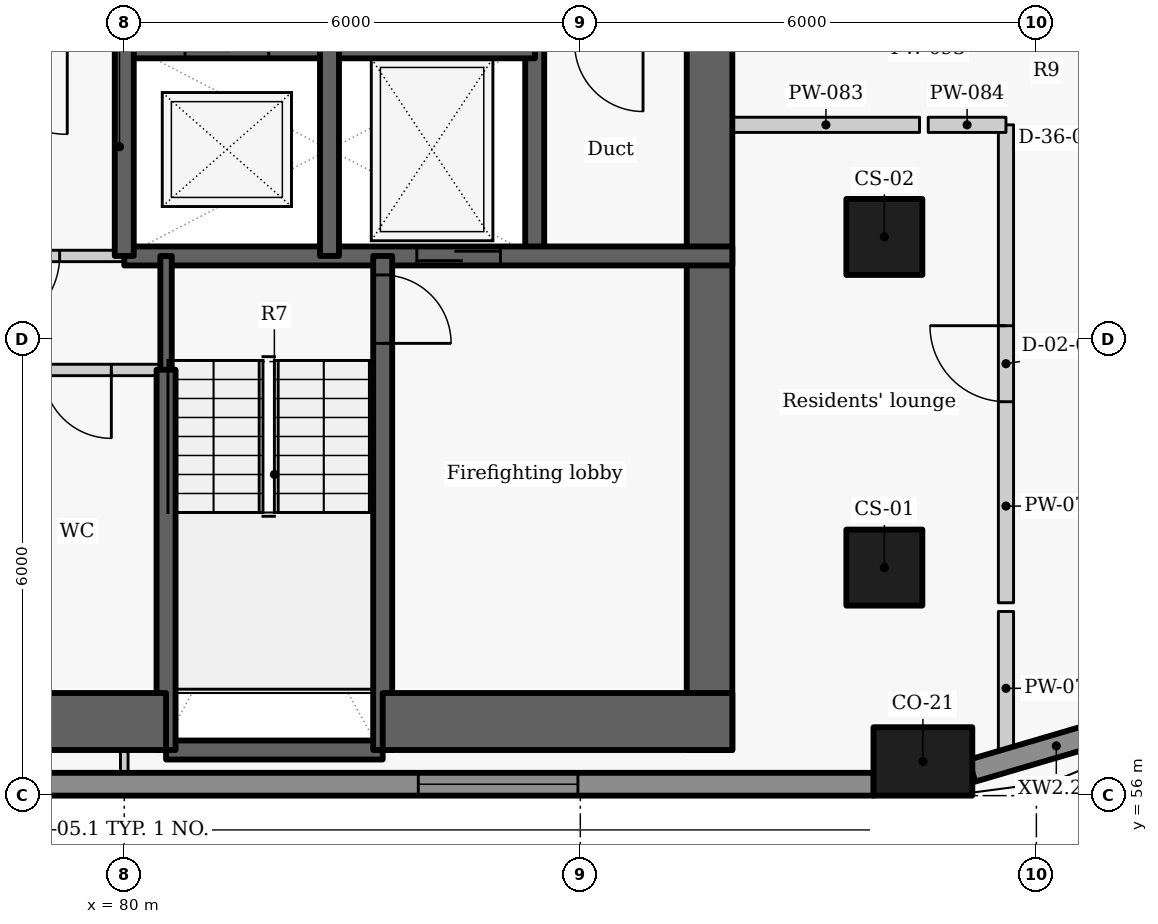
"""IFC4 building model, lengths in metres.
Left out: names, types, materials, properties, quantities, classifications, styles, units other than length and angle.
Written with IfcOpenShell. Run it as: python <this file> out.ifc"""

import sys

from ifc_helpers import new_model, si_unit, direction, frame, frame_2d, origin, origin_2d, place, context, subcontext, project, spatial, rectangle, extrude, element, fill, save


model = new_model("IFC4")
c1 = context("Model", 3, precision=1e-05, world=origin(), true_north=direction((0.0, 1.0)))
c2 = subcontext(c1, "Body", "Model", "MODEL_VIEW")
j1 = project(units=[si_unit("LENGTHUNIT", "METRE"), si_unit("PLANEANGLEUNIT", "RADIAN")], contexts=[c1])
p1 = place(None, origin())
s1 = spatial("IfcSite", under=j1, at=p1, CompositionType="ELEMENT")
p2 = place(p1, origin())
s2 = spatial("IfcBuilding", under=s1, at=p2, CompositionType="ELEMENT")
p3 = place(p2, frame((0.0, 0.0, 166.8)))
s3 = spatial("IfcBuildingStorey", under=s2, at=p3, CompositionType="ELEMENT", Elevation=166.8)
p4 = place(p3, frame((90.507, 56.45, 0.0), z_axis=(0.0, 0.0, 1.0), x_axis=(1.0, 0.0, 0.0)))
e1 = element("IfcColumn", 1, at=p4, inside=s3, PredefinedType="COLUMN", context=c2, shape_type="SweptSolid", body=[
    extrude(rectangle(XDim=1.3, YDim=0.9, at=origin_2d()), origin(), (0.0, 0.0, 1.0), 3.3),
])
for number, where, z_axis, x_axis in (
    (2, (90.0, 59.0, 0.0), (0.0, 0.0, 1.0), (0.0, 1.0, 0.0)),
    (3, (90.0, 63.35, 0.0), (0.0, 0.0, 1.0), (0.0, 1.0, 0.0)),
):
    element("IfcColumn", number, at=place(p3, frame(where, z_axis=z_axis, x_axis=x_axis)), inside=s3, PredefinedType="COLUMN", context=c2, shape_type="SweptSolid", body=[
        extrude(rectangle(XDim=1.0, YDim=1.0, at=origin_2d()), origin(), (0.0, 0.0, 1.0), 3.3),
    ])
p5 = place(p3, frame((69.821, 56.15, 0.0), z_axis=(0.0, 0.0, 1.0), x_axis=(1.0, 0.0, 0.0)))
e4 = element("IfcWall", 4, at=p5, inside=s3, PredefinedType="SOLIDWALL", context=c2, shape_type="SweptSolid", body=[
    extrude(rectangle(XDim=20.04, YDim=0.3, at=frame_2d((10.02, 0.0))), origin(), (0.0, 0.0, 1.0), 2.05),
])
p6 = place(p5, frame((4.051, 0.0, 0.9)))
e5 = element("IfcOpeningElement", 5, at=p6, cuts=e4, PredefinedType="OPENING", context=c2, shape_type="SweptSolid", body=[
    extrude(rectangle(XDim=2.1, YDim=1.1, at=frame_2d((1.05, 0.55))), frame((0.0, 0.16, 0.0), z_axis=(0.0, -1.0, 0.0), x_axis=(1.0, 0.0, 0.0)), (0.0, 0.0, 1.0), 0.32),
])
p7 = place(p5, frame((14.047, 0.0, 0.9)))
e6 = element("IfcOpeningElement", 6, at=p7, cuts=e4, PredefinedType="OPENING", context=c2, shape_type="SweptSolid", body=[
    extrude(rectangle(XDim=2.1, YDim=1.1, at=frame_2d((1.05, 0.55))), frame((0.0, 0.16, 0.0), z_axis=(0.0, -1.0, 0.0), x_axis=(1.0, 0.0, 0.0)), (0.0, 0.0, 1.0), 0.32),
])
p8 = place(p3, frame((91.153, 56.328, 0.0), z_axis=(0.0, 0.0, 1.0), x_axis=(0.959473072336, 0.281800325517, 0.0)))
e7 = element("IfcWall", 7, at=p8, inside=s3, PredefinedType="SOLIDWALL", context=c2, shape_type="SweptSolid", body=[
    extrude(rectangle(XDim=2.312, YDim=0.3, at=frame_2d((1.156, 0.0))), origin(), (0.0, 0.0, 1.0), 2.05),
])
p9 = place(p3, frame((85.4, 63.1, -0.275), z_axis=(0.0, 0.0, 1.0), x_axis=(0.0, 1.0, 0.0)))
e8 = element("IfcWall", 8, at=p9, inside=s3, PredefinedType="SHEAR", context=c2, shape_type="SweptSolid", body=[
    extrude(rectangle(XDim=2.8, YDim=0.25, at=frame_2d((1.4, 0.0))), origin(), (0.0, 0.0, 1.0), 3.225),
])
p10 = place(p3, frame((87.7, 72.2, -0.275), z_axis=(0.0, 0.0, 1.0), x_axis=(0.0, -1.0, 0.0)))
e9 = element("IfcWall", 9, at=p10, inside=s3, PredefinedType="SHEAR", context=c2, shape_type="SweptSolid", body=[
    extrude(rectangle(XDim=15.6, YDim=0.6, at=frame_2d((7.8, 0.0))), origin(), (0.0, 0.0, 1.0), 3.225),
])
p11 = place(p10, frame((3.852, 0.0, 0.275)))
e10 = element("IfcOpeningElement", 10, at=p11, cuts=e9, PredefinedType="OPENING", context=c2, shape_type="SweptSolid", body=[
    extrude(rectangle(XDim=1.5, YDim=2.1, at=frame_2d((0.75, 1.05))), frame((0.0, 0.31, 0.0), z_axis=(0.0, -1.0, 0.0), x_axis=(1.0, 0.0, 0.0)), (0.0, 0.0, 1.0), 0.62),
])
p12 = place(p3, frame((79.997, 65.9, -0.275), z_axis=(0.0, 0.0, 1.0), x_axis=(1.0, 0.0, 0.0)))
e11 = element("IfcWall", 11, at=p12, inside=s3, PredefinedType="SHEAR", context=c2, shape_type="SweptSolid", body=[
    extrude(rectangle(XDim=5.406, YDim=0.4, at=frame_2d((2.703, 0.0))), origin(), (0.0, 0.0, 1.0), 3.225),
])
p13 = place(p12, frame((0.803, 0.0, 0.275)))
e12 = element("IfcOpeningElement", 12, at=p13, cuts=e11, PredefinedType="OPENING", context=c2, shape_type="SweptSolid", body=[
    extrude(rectangle(XDim=1.1, YDim=2.1, at=frame_2d((0.55, 1.05))), frame((0.0, 0.21, 0.0), z_axis=(0.0, -1.0, 0.0), x_axis=(1.0, 0.0, 0.0)), (0.0, 0.0, 1.0), 0.42),
])
p14 = place(p3, frame((80.0, 63.1, -0.275), z_axis=(0.0, 0.0, 1.0), x_axis=(1.0, 0.0, 0.0)))
e13 = element("IfcWall", 13, at=p14, inside=s3, PredefinedType="SHEAR", context=c2, shape_type="SweptSolid", body=[
    extrude(rectangle(XDim=8.0, YDim=0.25, at=frame_2d((4.0, 0.0))), origin(), (0.0, 0.0, 1.0), 3.225),
])
p15 = place(p14, frame((3.849, 0.0, 0.275)))
e14 = element("IfcOpeningElement", 14, at=p15, cuts=e13, PredefinedType="OPENING", context=c2, shape_type="SweptSolid", body=[
    extrude(rectangle(XDim=1.1, YDim=2.1, at=frame_2d((0.55, 1.05))), frame((0.0, 0.135, 0.0), z_axis=(0.0, -1.0, 0.0), x_axis=(1.0, 0.0, 0.0)), (0.0, 0.0, 1.0), 0.27),
])
p16 = place(p3, frame((80.0, 63.1, -0.275), z_axis=(0.0, 0.0, 1.0), x_axis=(0.0, 1.0, 0.0)))
e15 = element("IfcWall", 15, at=p16, inside=s3, PredefinedType="SHEAR", context=c2, shape_type="SweptSolid", body=[
    extrude(rectangle(XDim=2.8, YDim=0.25, at=frame_2d((1.4, 0.0))), origin(), (0.0, 0.0, 1.0), 3.225),
])
p17 = place(p3, frame((80.0, 63.1, 0.0), z_axis=(0.0, 0.0, 1.0), x_axis=(-1.0, 0.0, 0.0)))
e16 = element("IfcWall", 16, at=p17, inside=s3, PredefinedType="PARTITIONING", context=c2, shape_type="SweptSolid", body=[
    extrude(rectangle(XDim=2.7, YDim=0.15, at=frame_2d((1.35, 0.0))), origin(), (0.0, 0.0, 1.0), 2.95),
])
p18 = place(p17, frame((0.85, 0.0, 0.0)))
e17 = element("IfcOpeningElement", 17, at=p18, cuts=e16, PredefinedType="OPENING", context=c2, shape_type="SweptSolid", body=[
    extrude(rectangle(XDim=1.0, YDim=2.1, at=frame_2d((0.5, 1.05))), frame((0.0, 0.085, 0.0), z_axis=(0.0, -1.0, 0.0), x_axis=(1.0, 0.0, 0.0)), (0.0, 0.0, 1.0), 0.17),
])
p19 = place(p3, frame((82.7, 63.1, -0.275), z_axis=(0.0, 0.0, 1.0), x_axis=(0.0, 1.0, 0.0)))
e18 = element("IfcWall", 18, at=p19, inside=s3, PredefinedType="SHEAR", context=c2, shape_type="SweptSolid", body=[
    extrude(rectangle(XDim=2.8, YDim=0.25, at=frame_2d((1.4, 0.0))), origin(), (0.0, 0.0, 1.0), 3.225),
])
p20 = place(p3, frame((80.55, 56.6, -0.275), z_axis=(0.0, 0.0, 1.0), x_axis=(1.0, 0.0, 0.0)))
e19 = element("IfcWall", 19, at=p20, inside=s3, PredefinedType="SHEAR", context=c2, shape_type="SweptSolid", body=[
    extrude(rectangle(XDim=2.85, YDim=0.25, at=frame_2d((1.425, 0.0))), origin(), (0.0, 0.0, 1.0), 3.225),
])
p21 = place(p3, frame((83.4, 63.1, -0.275), z_axis=(0.0, 0.0, 1.0), x_axis=(0.0, -1.0, 0.0)))
e20 = element("IfcWall", 20, at=p21, inside=s3, PredefinedType="SHEAR", context=c2, shape_type="SweptSolid", body=[
    extrude(rectangle(XDim=6.5, YDim=0.25, at=frame_2d((3.25, 0.0))), origin(), (0.0, 0.0, 1.0), 3.225),
])
p22 = place(p21, frame((0.25, 0.0, 0.275)))
e21 = element("IfcOpeningElement", 21, at=p22, cuts=e20, PredefinedType="OPENING", context=c2, shape_type="SweptSolid", body=[
    extrude(rectangle(XDim=0.9, YDim=2.1, at=frame_2d((0.45, 1.05))), frame((0.0, 0.135, 0.0), z_axis=(0.0, -1.0, 0.0), x_axis=(1.0, 0.0, 0.0)), (0.0, 0.0, 1.0), 0.27),
])
p23 = place(p3, frame((80.55, 61.597, -0.275), z_axis=(0.0, 0.0, 1.0), x_axis=(0.0, 1.0, 0.0)))
e22 = element("IfcWall", 22, at=p23, inside=s3, PredefinedType="SHEAR", context=c2, shape_type="SweptSolid", body=[
    extrude(rectangle(XDim=1.503, YDim=0.15, at=frame_2d((0.751, 0.0))), origin(), (0.0, 0.0, 1.0), 3.225),
])
p24 = place(p3, frame((80.55, 56.6, -0.275), z_axis=(0.0, 0.0, 1.0), x_axis=(0.0, 1.0, 0.0)))
e23 = element("IfcWall", 23, at=p24, inside=s3, PredefinedType="SHEAR", context=c2, shape_type="SweptSolid", body=[
    extrude(rectangle(XDim=5.003, YDim=0.25, at=frame_2d((2.501, 0.0))), origin(), (0.0, 0.0, 1.0), 3.225),
])
p25 = place(p3, frame((75.35, 56.975, -0.275), z_axis=(0.0, 0.0, 1.0), x_axis=(1.0, 0.0, 0.0)))
e24 = element("IfcWall", 24, at=p25, inside=s3, PredefinedType="SHEAR", context=c2, shape_type="SweptSolid", body=[
    extrude(rectangle(XDim=5.2, YDim=0.75, at=frame_2d((2.6, 0.0))), origin(), (0.0, 0.0, 1.0), 3.225),
])
p26 = place(p3, frame((83.4, 56.975, -0.275), z_axis=(0.0, 0.0, 1.0), x_axis=(1.0, 0.0, 0.0)))
e25 = element("IfcWall", 25, at=p26, inside=s3, PredefinedType="SHEAR", context=c2, shape_type="SweptSolid", body=[
    extrude(rectangle(XDim=4.6, YDim=0.75, at=frame_2d((2.3, 0.0))), origin(), (0.0, 0.0, 1.0), 3.225),
])
p27 = place(p3, frame((80.55, 61.6, 0.0), z_axis=(0.0, 0.0, 1.0), x_axis=(-1.0, 0.0, 0.0)))
e26 = element("IfcWall", 26, at=p27, inside=s3, PredefinedType="PARTITIONING", context=c2, shape_type="SweptSolid", body=[
    extrude(rectangle(XDim=5.2, YDim=0.15, at=frame_2d((2.6, 0.0))), origin(), (0.0, 0.0, 1.0), 2.95),
])
p28 = place(p27, frame((4.1, 0.0, 0.0)))
e27 = element("IfcOpeningElement", 27, at=p28, cuts=e26, PredefinedType="OPENING", context=c2, shape_type="SweptSolid", body=[
    extrude(rectangle(XDim=0.9, YDim=2.1, at=frame_2d((0.45, 1.05))), frame((0.0, 0.085, 0.0), z_axis=(0.0, -1.0, 0.0), x_axis=(1.0, 0.0, 0.0)), (0.0, 0.0, 1.0), 0.17),
])
p29 = place(p27, frame((2.67, 0.0, 0.0)))
e28 = element("IfcOpeningElement", 28, at=p29, cuts=e26, PredefinedType="OPENING", context=c2, shape_type="SweptSolid", body=[
    extrude(rectangle(XDim=0.9, YDim=2.1, at=frame_2d((0.45, 1.05))), frame((0.0, 0.085, 0.0), z_axis=(0.0, -1.0, 0.0), x_axis=(1.0, 0.0, 0.0)), (0.0, 0.0, 1.0), 0.17),
])
p30 = place(p27, frame((0.72, 0.0, 0.0)))
e29 = element("IfcOpeningElement", 29, at=p30, cuts=e26, PredefinedType="OPENING", context=c2, shape_type="SweptSolid", body=[
    extrude(rectangle(XDim=0.9, YDim=2.1, at=frame_2d((0.45, 1.05))), frame((0.0, 0.085, 0.0), z_axis=(0.0, -1.0, 0.0), x_axis=(1.0, 0.0, 0.0)), (0.0, 0.0, 1.0), 0.17),
])
p31 = place(p3, frame((91.6, 56.401, 0.0), z_axis=(0.0, 0.0, 1.0), x_axis=(0.0, 1.0, 0.0)))
e30 = element("IfcWall", 30, at=p31, inside=s3, PredefinedType="PARTITIONING", context=c2, shape_type="SweptSolid", body=[
    extrude(rectangle(XDim=2.022, YDim=0.2, at=frame_2d((1.011, 0.0))), origin(), (0.0, 0.0, 1.0), 2.03),
])
p32 = place(p3, frame((91.6, 58.537, 0.0), z_axis=(0.0, 0.0, 1.0), x_axis=(0.0, 1.0, 0.0)))
e31 = element("IfcWall", 31, at=p32, inside=s3, PredefinedType="PARTITIONING", context=c2, shape_type="SweptSolid", body=[
    extrude(rectangle(XDim=6.288, YDim=0.2, at=frame_2d((3.144, 0.0))), origin(), (0.0, 0.0, 1.0), 2.95),
])
p33 = place(p32, frame((2.645, 0.0, 0.0)))
e32 = element("IfcOpeningElement", 32, at=p33, cuts=e31, PredefinedType="OPENING", context=c2, shape_type="SweptSolid", body=[
    extrude(rectangle(XDim=1.0, YDim=2.1, at=frame_2d((0.5, 1.05))), frame((0.0, 0.11, 0.0), z_axis=(0.0, -1.0, 0.0), x_axis=(1.0, 0.0, 0.0)), (0.0, 0.0, 1.0), 0.22),
])
p34 = place(p3, frame((88.0, 64.825, 0.0), z_axis=(0.0, 0.0, 1.0), x_axis=(1.0, 0.0, 0.0)))
e33 = element("IfcWall", 33, at=p34, inside=s3, PredefinedType="PARTITIONING", context=c2, shape_type="SweptSolid", body=[
    extrude(rectangle(XDim=2.463, YDim=0.2, at=frame_2d((1.231, 0.0))), origin(), (0.0, 0.0, 1.0), 2.43),
])
p35 = place(p3, frame((90.577, 64.825, 0.0), z_axis=(0.0, 0.0, 1.0), x_axis=(1.0, 0.0, 0.0)))
e34 = element("IfcWall", 34, at=p35, inside=s3, PredefinedType="PARTITIONING", context=c2, shape_type="SweptSolid", body=[
    extrude(rectangle(XDim=1.023, YDim=0.2, at=frame_2d((0.511, 0.0))), origin(), (0.0, 0.0, 1.0), 2.95),
])
p36 = place(p3, frame((80.0, 56.3, 0.0), z_axis=(0.0, 0.0, 1.0), x_axis=(0.0, 1.0, 0.0)))
e35 = element("IfcWall", 35, at=p36, inside=s3, PredefinedType="PARTITIONING", context=c2, shape_type="SweptSolid", body=[
    extrude(rectangle(XDim=0.3, YDim=0.1, at=frame_2d((0.15, 0.0))), origin(), (0.0, 0.0, 1.0), 2.95),
])
p37 = place(p7, origin())
e36 = element("IfcWindow", 36, at=p37, inside=s3, PartitioningType="SINGLE_PANEL", PredefinedType="WINDOW", context=c2, shape_type="SweptSolid", body=[
    extrude(rectangle(XDim=2.1, YDim=1.1, at=frame_2d((1.05, 0.55))), frame((0.0, 0.03, 0.0), z_axis=(0.0, -1.0, 0.0), x_axis=(1.0, 0.0, 0.0)), (0.0, 0.0, 1.0), 0.06),
])
fill(e6, e36)
p38 = place(p15, origin())
e37 = element("IfcDoor", 37, at=p38, inside=s3, OperationType="SLIDING_TO_LEFT", PredefinedType="DOOR", context=c2, shape_type="SweptSolid", body=[
    extrude(rectangle(XDim=1.1, YDim=2.1, at=frame_2d((0.55, 1.05))), frame((0.0, 0.025, 0.0), z_axis=(0.0, -1.0, 0.0), x_axis=(1.0, 0.0, 0.0)), (0.0, 0.0, 1.0), 0.05),
])
fill(e14, e37)
p39 = place(p18, origin())
e38 = element("IfcDoor", 38, at=p39, inside=s3, OperationType="SINGLE_SWING_RIGHT", PredefinedType="DOOR", context=c2, shape_type="SweptSolid", body=[
    extrude(rectangle(XDim=1.0, YDim=2.1, at=frame_2d((0.5, 1.05))), frame((0.0, 0.025, 0.0), z_axis=(0.0, -1.0, 0.0), x_axis=(1.0, 0.0, 0.0)), (0.0, 0.0, 1.0), 0.05),
])
fill(e17, e38)
p40 = place(p30, origin())
e39 = element("IfcDoor", 39, at=p40, inside=s3, OperationType="SINGLE_SWING_LEFT", PredefinedType="DOOR", context=c2, shape_type="SweptSolid", body=[
    extrude(rectangle(XDim=0.9, YDim=2.1, at=frame_2d((0.45, 1.05))), frame((0.0, 0.025, 0.0), z_axis=(0.0, -1.0, 0.0), x_axis=(1.0, 0.0, 0.0)), (0.0, 0.0, 1.0), 0.05),
])
fill(e29, e39)
p41 = place(p22, origin())
e40 = element("IfcDoor", 40, at=p41, inside=s3, OperationType="SINGLE_SWING_RIGHT", PredefinedType="DOOR", context=c2, shape_type="SweptSolid", body=[
    extrude(rectangle(XDim=0.9, YDim=2.1, at=frame_2d((0.45, 1.05))), frame((0.0, 0.025, 0.0), z_axis=(0.0, -1.0, 0.0), x_axis=(1.0, 0.0, 0.0)), (0.0, 0.0, 1.0), 0.05),
])
fill(e21, e40)
p42 = place(p33, origin())
e41 = element("IfcDoor", 41, at=p42, inside=s3, OperationType="SINGLE_SWING_RIGHT", PredefinedType="DOOR", context=c2, shape_type="SweptSolid", body=[
    extrude(rectangle(XDim=1.0, YDim=2.1, at=frame_2d((0.5, 1.05))), frame((0.0, 0.025, 0.0), z_axis=(0.0, -1.0, 0.0), x_axis=(1.0, 0.0, 0.0)), (0.0, 0.0, 1.0), 0.05),
])
fill(e32, e41)
save(model, sys.argv[1])
